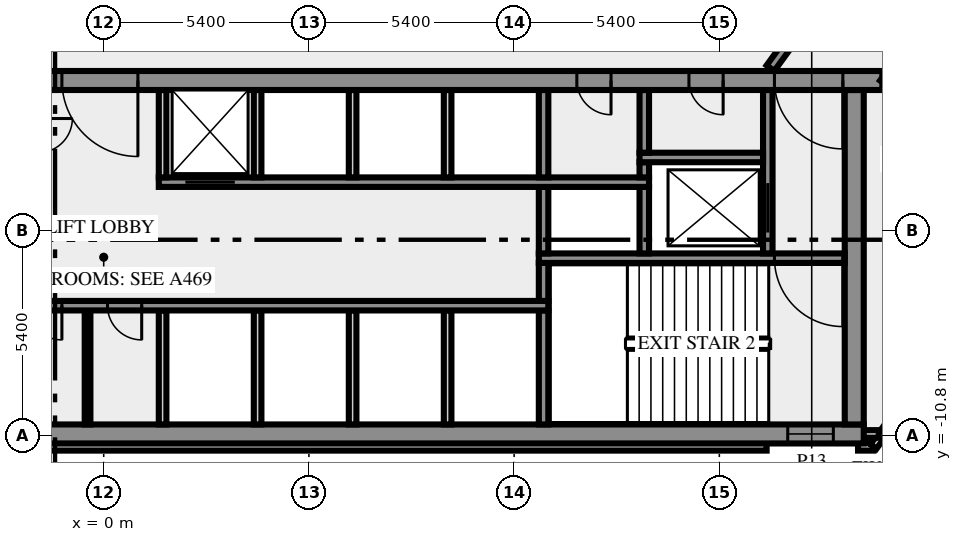
"""IFC4 building model, lengths in metres.
Left out: names, types, materials, properties, quantities, classifications, styles, units other than length and angle.
Written with IfcOpenShell. Run it as: python <this file> out.ifc"""

import sys

from ifc_helpers import new_model, si_unit, direction, frame, frame_2d, origin, place, context, subcontext, project, spatial, rectangle, extrude, element, fill, save


model = new_model("IFC4")
c1 = context("Model", 3, precision=1e-05, world=origin(), true_north=direction((0.0, 1.0)))
c2 = subcontext(c1, "Body", "Model", "MODEL_VIEW")
j1 = project(units=[si_unit("LENGTHUNIT", "METRE"), si_unit("PLANEANGLEUNIT", "RADIAN")], contexts=[c1])
p1 = place(None, origin())
s1 = spatial("IfcSite", under=j1, at=p1, CompositionType="ELEMENT")
p2 = place(p1, origin())
s2 = spatial("IfcBuilding", under=s1, at=p2, CompositionType="ELEMENT")
p3 = place(p2, frame((0.0, 0.0, 105.0)))
s3 = spatial("IfcBuildingStorey", under=s2, at=p3, CompositionType="ELEMENT", Elevation=105.0)
p4 = place(p3, frame((-17.444, -11.088, 0.0), z_axis=(0.0, 0.0, 1.0), x_axis=(1.0, 0.0, 0.0)))
e1 = element("IfcWall", 1, at=p4, inside=s3, PredefinedType="SOLIDWALL", context=c2, shape_type="SweptSolid", body=[
    extrude(rectangle(XDim=34.888, YDim=0.2, at=frame_2d((17.444, 0.0))), origin(), (0.0, 0.0, 1.0), 3.65),
])
p5 = place(p3, frame((19.85, -11.088, 0.0), z_axis=(0.0, 0.0, 1.0), x_axis=(1.0, 0.0, 0.0)))
e2 = element("IfcWall", 2, at=p5, inside=s3, PredefinedType="SOLIDWALL", context=c2, shape_type="SweptSolid", body=[
    extrude(rectangle(XDim=0.406, YDim=0.2, at=frame_2d((0.203, 0.0))), origin(), (0.0, 0.0, 1.0), 3.65),
])
p6 = place(p3, frame((20.253, -11.083, 0.0), z_axis=(0.0, 0.0, 1.0), x_axis=(0.587766567315, 0.809030569476, 0.0)))
e3 = element("IfcWall", 3, at=p6, inside=s3, PredefinedType="SOLIDWALL", context=c2, shape_type="SweptSolid", body=[
    extrude(rectangle(XDim=2.688, YDim=0.2, at=frame_2d((1.344, 0.0))), origin(), (0.0, 0.0, 1.0), 3.65),
])
p7 = place(p3, frame((19.98, -10.75, 0.0), z_axis=(0.0, 0.0, 1.0), x_axis=(1.0, 0.0, 0.0)))
e4 = element("IfcWall", 4, at=p7, inside=s3, PredefinedType="SOLIDWALL", context=c2, shape_type="SweptSolid", body=[
    extrude(rectangle(XDim=0.417, YDim=0.2, at=frame_2d((0.208, 0.0))), origin(), (0.0, 0.0, 1.0), 3.65),
])
p8 = place(p3, frame((-20.0, -10.75, 0.0), z_axis=(0.0, 0.0, 1.0), x_axis=(1.0, 0.0, 0.0)))
e5 = element("IfcWall", 5, at=p8, inside=s3, PredefinedType="SHEAR", context=c2, shape_type="SweptSolid", body=[
    extrude(rectangle(XDim=40.0, YDim=0.5, at=frame_2d((20.0, 0.0))), origin(), (0.0, 0.0, 1.0), 3.65),
])
p9 = place(p8, frame((0.8, 0.0, 1.0)))
e6 = element("IfcOpeningElement", 6, at=p9, cuts=e5, PredefinedType="OPENING", context=c2, shape_type="SweptSolid", body=[
    extrude(rectangle(XDim=1.2, YDim=1.2, at=frame_2d((0.6, 0.6))), frame((0.0, 0.26, 0.0), z_axis=(0.0, -1.0, 0.0), x_axis=(1.0, 0.0, 0.0)), (0.0, 0.0, 1.0), 0.52),
])
p10 = place(p8, frame((38.0, 0.0, 1.0)))
e7 = element("IfcOpeningElement", 7, at=p10, cuts=e5, PredefinedType="OPENING", context=c2, shape_type="SweptSolid", body=[
    extrude(rectangle(XDim=1.2, YDim=1.2, at=frame_2d((0.6, 0.6))), frame((0.0, 0.26, 0.0), z_axis=(0.0, -1.0, 0.0), x_axis=(1.0, 0.0, 0.0)), (0.0, 0.0, 1.0), 0.52),
])
p11 = place(p3, frame((-0.425, -10.5, 0.0), z_axis=(0.0, 0.0, 1.0), x_axis=(0.0, 1.0, 0.0)))
e8 = element("IfcWall", 8, at=p11, inside=s3, PredefinedType="PARTITIONING", context=c2, shape_type="SweptSolid", body=[
    extrude(rectangle(XDim=3.0, YDim=0.15, at=frame_2d((1.5, 0.0))), origin(), (0.0, 0.0, 1.0), 3.65),
])
for number, where, z_axis, x_axis in (
    (9, (1.55, -10.5, 0.0), (0.0, 0.0, 1.0), (0.0, 1.0, 0.0)),
    (10, (4.05, -10.5, 0.0), (0.0, 0.0, 1.0), (0.0, 1.0, 0.0)),
    (11, (6.55, -10.5, 0.0), (0.0, 0.0, 1.0), (0.0, 1.0, 0.0)),
    (12, (9.05, -10.5, 0.0), (0.0, 0.0, 1.0), (0.0, 1.0, 0.0)),
):
    element("IfcWall", number, at=place(p3, frame(where, z_axis=z_axis, x_axis=x_axis)), inside=s3, PredefinedType="SOLIDWALL", context=c2, shape_type="SweptSolid", body=[
        extrude(rectangle(XDim=3.0, YDim=0.2, at=frame_2d((1.5, 0.0))), origin(), (0.0, 0.0, 1.0), 3.65),
    ])
p12 = place(p3, frame((11.575, -10.5, 0.0), z_axis=(0.0, 0.0, 1.0), x_axis=(0.0, 1.0, 0.0)))
e13 = element("IfcWall", 13, at=p12, inside=s3, PredefinedType="SHEAR", context=c2, shape_type="SweptSolid", body=[
    extrude(rectangle(XDim=3.0, YDim=0.25, at=frame_2d((1.5, 0.0))), origin(), (0.0, 0.0, 1.0), 3.65),
])
p13 = place(p3, frame((19.75, -10.5, 0.0), z_axis=(0.0, 0.0, 1.0), x_axis=(0.0, 1.0, 0.0)))
e14 = element("IfcWall", 14, at=p13, inside=s3, PredefinedType="SHEAR", context=c2, shape_type="SweptSolid", body=[
    extrude(rectangle(XDim=8.8, YDim=0.5, at=frame_2d((4.4, 0.0))), origin(), (0.0, 0.0, 1.0), 3.65),
])
p14 = place(p3, frame((11.7, -7.375, 0.0), z_axis=(0.0, 0.0, 1.0), x_axis=(-1.0, 0.0, 0.0)))
e15 = element("IfcWall", 15, at=p14, inside=s3, PredefinedType="SHEAR", context=c2, shape_type="SweptSolid", body=[
    extrude(rectangle(XDim=23.4, YDim=0.25, at=frame_2d((11.7, 0.0))), origin(), (0.0, 0.0, 1.0), 3.65),
])
p15 = place(p14, frame((21.45, 0.0, 0.0)))
e16 = element("IfcOpeningElement", 16, at=p15, cuts=e15, PredefinedType="OPENING", context=c2, shape_type="SweptSolid", body=[
    extrude(rectangle(XDim=1.1, YDim=2.1, at=frame_2d((0.55, 1.05))), frame((0.0, 0.135, 0.0), z_axis=(0.0, -1.0, 0.0), x_axis=(1.0, 0.0, 0.0)), (0.0, 0.0, 1.0), 0.27),
])
p16 = place(p14, frame((18.95, 0.0, 0.0)))
e17 = element("IfcOpeningElement", 17, at=p16, cuts=e15, PredefinedType="OPENING", context=c2, shape_type="SweptSolid", body=[
    extrude(rectangle(XDim=1.1, YDim=2.1, at=frame_2d((0.55, 1.05))), frame((0.0, 0.135, 0.0), z_axis=(0.0, -1.0, 0.0), x_axis=(1.0, 0.0, 0.0)), (0.0, 0.0, 1.0), 0.27),
])
p17 = place(p14, frame((16.45, 0.0, 0.0)))
e18 = element("IfcOpeningElement", 18, at=p17, cuts=e15, PredefinedType="OPENING", context=c2, shape_type="SweptSolid", body=[
    extrude(rectangle(XDim=1.1, YDim=2.1, at=frame_2d((0.55, 1.05))), frame((0.0, 0.135, 0.0), z_axis=(0.0, -1.0, 0.0), x_axis=(1.0, 0.0, 0.0)), (0.0, 0.0, 1.0), 0.27),
])
p18 = place(p14, frame((14.65, 0.0, 0.0)))
e19 = element("IfcOpeningElement", 19, at=p18, cuts=e15, PredefinedType="OPENING", context=c2, shape_type="SweptSolid", body=[
    extrude(rectangle(XDim=0.8, YDim=2.1, at=frame_2d((0.4, 1.05))), frame((0.0, 0.135, 0.0), z_axis=(0.0, -1.0, 0.0), x_axis=(1.0, 0.0, 0.0)), (0.0, 0.0, 1.0), 0.27),
])
p19 = place(p14, frame((12.8, 0.0, 0.0)))
e20 = element("IfcOpeningElement", 20, at=p19, cuts=e15, PredefinedType="OPENING", context=c2, shape_type="SweptSolid", body=[
    extrude(rectangle(XDim=0.9, YDim=2.1, at=frame_2d((0.45, 1.05))), frame((0.0, 0.135, 0.0), z_axis=(0.0, -1.0, 0.0), x_axis=(1.0, 0.0, 0.0)), (0.0, 0.0, 1.0), 0.27),
])
p20 = place(p14, frame((10.7, 0.0, 0.0)))
e21 = element("IfcOpeningElement", 21, at=p20, cuts=e15, PredefinedType="OPENING", context=c2, shape_type="SweptSolid", body=[
    extrude(rectangle(XDim=0.9, YDim=2.1, at=frame_2d((0.45, 1.05))), frame((0.0, 0.135, 0.0), z_axis=(0.0, -1.0, 0.0), x_axis=(1.0, 0.0, 0.0)), (0.0, 0.0, 1.0), 0.27),
])
p21 = place(p3, frame((11.575, -7.25, 0.0), z_axis=(0.0, 0.0, 1.0), x_axis=(0.0, 1.0, 0.0)))
e22 = element("IfcWall", 22, at=p21, inside=s3, PredefinedType="SHEAR", context=c2, shape_type="SweptSolid", body=[
    extrude(rectangle(XDim=1.0, YDim=0.25, at=frame_2d((0.5, 0.0))), origin(), (0.0, 0.0, 1.0), 3.65),
])
p22 = place(p3, frame((19.5, -6.125, 0.0), z_axis=(0.0, 0.0, 1.0), x_axis=(-1.0, 0.0, 0.0)))
e23 = element("IfcWall", 23, at=p22, inside=s3, PredefinedType="SHEAR", context=c2, shape_type="SweptSolid", body=[
    extrude(rectangle(XDim=8.05, YDim=0.25, at=frame_2d((4.025, 0.0))), origin(), (0.0, 0.0, 1.0), 3.65),
])
p23 = place(p22, frame((0.05, 0.0, 0.0)))
e24 = element("IfcOpeningElement", 24, at=p23, cuts=e23, PredefinedType="OPENING", context=c2, shape_type="SweptSolid", body=[
    extrude(rectangle(XDim=1.8, YDim=2.1, at=frame_2d((0.9, 1.05))), frame((0.0, 0.135, 0.0), z_axis=(0.0, -1.0, 0.0), x_axis=(1.0, 0.0, 0.0)), (0.0, 0.0, 1.0), 0.27),
])
for number, where, z_axis, x_axis in (
    (25, (11.575, -6.0, 0.0), (0.0, 0.0, 1.0), (0.0, 1.0, 0.0)),
    (26, (14.225, -6.0, 0.0), (0.0, 0.0, 1.0), (0.0, 1.0, 0.0)),
):
    element("IfcWall", number, at=place(p3, frame(where, z_axis=z_axis, x_axis=x_axis)), inside=s3, PredefinedType="SHEAR", context=c2, shape_type="SweptSolid", body=[
        extrude(rectangle(XDim=1.75, YDim=0.25, at=frame_2d((0.875, 0.0))), origin(), (0.0, 0.0, 1.0), 3.65),
    ])
p24 = place(p3, frame((17.475, -6.0, 0.0), z_axis=(0.0, 0.0, 1.0), x_axis=(0.0, 1.0, 0.0)))
e27 = element("IfcWall", 27, at=p24, inside=s3, PredefinedType="SHEAR", context=c2, shape_type="SweptSolid", body=[
    extrude(rectangle(XDim=4.3, YDim=0.25, at=frame_2d((2.15, 0.0))), origin(), (0.0, 0.0, 1.0), 3.65),
])
p25 = place(p24, frame((0.55, 0.0, 0.0)))
e28 = element("IfcOpeningElement", 28, at=p25, cuts=e27, PredefinedType="OPENING", context=c2, shape_type="SweptSolid", body=[
    extrude(rectangle(XDim=1.3, YDim=2.1, at=frame_2d((0.65, 1.05))), frame((0.0, 0.135, 0.0), z_axis=(0.0, -1.0, 0.0), x_axis=(1.0, 0.0, 0.0)), (0.0, 0.0, 1.0), 0.27),
])
p26 = place(p3, frame((1.45, -4.125, 0.0), z_axis=(0.0, 0.0, 1.0), x_axis=(1.0, 0.0, 0.0)))
e29 = element("IfcWall", 29, at=p26, inside=s3, PredefinedType="SHEAR", context=c2, shape_type="SweptSolid", body=[
    extrude(rectangle(XDim=12.9, YDim=0.25, at=frame_2d((6.45, 0.0))), origin(), (0.0, 0.0, 1.0), 3.65),
])
p27 = place(p26, frame((0.7, 0.0, 0.0)))
e30 = element("IfcOpeningElement", 30, at=p27, cuts=e29, PredefinedType="OPENING", context=c2, shape_type="SweptSolid", body=[
    extrude(rectangle(XDim=1.3, YDim=2.1, at=frame_2d((0.65, 1.05))), frame((0.0, 0.135, 0.0), z_axis=(0.0, -1.0, 0.0), x_axis=(1.0, 0.0, 0.0)), (0.0, 0.0, 1.0), 0.27),
])
for number, where, z_axis, x_axis in (
    (31, (1.55, -4.0, 0.0), (0.0, 0.0, 1.0), (0.0, 1.0, 0.0)),
    (32, (4.05, -4.0, 0.0), (0.0, 0.0, 1.0), (0.0, 1.0, 0.0)),
    (33, (6.55, -4.0, 0.0), (0.0, 0.0, 1.0), (0.0, 1.0, 0.0)),
    (34, (9.05, -4.0, 0.0), (0.0, 0.0, 1.0), (0.0, 1.0, 0.0)),
):
    element("IfcWall", number, at=place(p3, frame(where, z_axis=z_axis, x_axis=x_axis)), inside=s3, PredefinedType="SOLIDWALL", context=c2, shape_type="SweptSolid", body=[
        extrude(rectangle(XDim=2.3, YDim=0.2, at=frame_2d((1.15, 0.0))), origin(), (0.0, 0.0, 1.0), 3.65),
    ])
p28 = place(p3, frame((11.575, -4.0, 0.0), z_axis=(0.0, 0.0, 1.0), x_axis=(0.0, 1.0, 0.0)))
e35 = element("IfcWall", 35, at=p28, inside=s3, PredefinedType="SHEAR", context=c2, shape_type="SweptSolid", body=[
    extrude(rectangle(XDim=2.3, YDim=0.25, at=frame_2d((1.15, 0.0))), origin(), (0.0, 0.0, 1.0), 3.65),
])
p29 = place(p3, frame((14.225, -4.0, 0.0), z_axis=(0.0, 0.0, 1.0), x_axis=(0.0, 1.0, 0.0)))
e36 = element("IfcWall", 36, at=p29, inside=s3, PredefinedType="SHEAR", context=c2, shape_type="SweptSolid", body=[
    extrude(rectangle(XDim=0.4, YDim=0.25, at=frame_2d((0.2, 0.0))), origin(), (0.0, 0.0, 1.0), 3.65),
])
p30 = place(p3, frame((14.1, -3.475, 0.0), z_axis=(0.0, 0.0, 1.0), x_axis=(1.0, 0.0, 0.0)))
e37 = element("IfcWall", 37, at=p30, inside=s3, PredefinedType="SHEAR", context=c2, shape_type="SweptSolid", body=[
    extrude(rectangle(XDim=3.25, YDim=0.25, at=frame_2d((1.625, 0.0))), origin(), (0.0, 0.0, 1.0), 3.65),
])
p31 = place(p3, frame((14.225, -3.35, 0.0), z_axis=(0.0, 0.0, 1.0), x_axis=(0.0, 1.0, 0.0)))
e38 = element("IfcWall", 38, at=p31, inside=s3, PredefinedType="SHEAR", context=c2, shape_type="SweptSolid", body=[
    extrude(rectangle(XDim=1.65, YDim=0.25, at=frame_2d((0.825, 0.0))), origin(), (0.0, 0.0, 1.0), 3.65),
])
p32 = place(p3, frame((20.49, -1.45, 0.0), z_axis=(0.0, 0.0, 1.0), x_axis=(-1.0, 0.0, 0.0)))
e39 = element("IfcWall", 39, at=p32, inside=s3, PredefinedType="SHEAR", context=c2, shape_type="SweptSolid", body=[
    extrude(rectangle(XDim=40.98, YDim=0.5, at=frame_2d((20.49, 0.0))), origin(), (0.0, 0.0, 1.0), 3.65),
])
p33 = place(p32, frame((38.14, 0.0, 0.0)))
e40 = element("IfcOpeningElement", 40, at=p33, cuts=e39, PredefinedType="OPENING", context=c2, shape_type="SweptSolid", body=[
    extrude(rectangle(XDim=1.8, YDim=2.1, at=frame_2d((0.9, 1.05))), frame((0.0, 0.26, 0.0), z_axis=(0.0, -1.0, 0.0), x_axis=(1.0, 0.0, 0.0)), (0.0, 0.0, 1.0), 0.52),
])
p34 = place(p32, frame((36.728, 0.0, 0.0)))
e41 = element("IfcOpeningElement", 41, at=p34, cuts=e39, PredefinedType="OPENING", context=c2, shape_type="SweptSolid", body=[
    extrude(rectangle(XDim=0.8, YDim=2.1, at=frame_2d((0.4, 1.05))), frame((0.0, 0.26, 0.0), z_axis=(0.0, -1.0, 0.0), x_axis=(1.0, 0.0, 0.0)), (0.0, 0.0, 1.0), 0.52),
])
p35 = place(p32, frame((35.153, 0.0, 0.0)))
e42 = element("IfcOpeningElement", 42, at=p35, cuts=e39, PredefinedType="OPENING", context=c2, shape_type="SweptSolid", body=[
    extrude(rectangle(XDim=0.8, YDim=2.1, at=frame_2d((0.4, 1.05))), frame((0.0, 0.26, 0.0), z_axis=(0.0, -1.0, 0.0), x_axis=(1.0, 0.0, 0.0)), (0.0, 0.0, 1.0), 0.52),
])
p36 = place(p32, frame((32.94, 0.0, 0.0)))
e43 = element("IfcOpeningElement", 43, at=p36, cuts=e39, PredefinedType="OPENING", context=c2, shape_type="SweptSolid", body=[
    extrude(rectangle(XDim=0.9, YDim=2.1, at=frame_2d((0.45, 1.05))), frame((0.0, 0.26, 0.0), z_axis=(0.0, -1.0, 0.0), x_axis=(1.0, 0.0, 0.0)), (0.0, 0.0, 1.0), 0.52),
])
p37 = place(p32, frame((19.59, 0.0, 0.0)))
e44 = element("IfcOpeningElement", 44, at=p37, cuts=e39, PredefinedType="OPENING", context=c2, shape_type="SweptSolid", body=[
    extrude(rectangle(XDim=2.0, YDim=2.1, at=frame_2d((1.0, 1.05))), frame((0.0, 0.26, 0.0), z_axis=(0.0, -1.0, 0.0), x_axis=(1.0, 0.0, 0.0)), (0.0, 0.0, 1.0), 0.52),
])
p38 = place(p32, frame((7.14, 0.0, 0.0)))
e45 = element("IfcOpeningElement", 45, at=p38, cuts=e39, PredefinedType="OPENING", context=c2, shape_type="SweptSolid", body=[
    extrude(rectangle(XDim=0.9, YDim=2.1, at=frame_2d((0.45, 1.05))), frame((0.0, 0.26, 0.0), z_axis=(0.0, -1.0, 0.0), x_axis=(1.0, 0.0, 0.0)), (0.0, 0.0, 1.0), 0.52),
])
p39 = place(p32, frame((4.19, 0.0, 0.0)))
e46 = element("IfcOpeningElement", 46, at=p39, cuts=e39, PredefinedType="OPENING", context=c2, shape_type="SweptSolid", body=[
    extrude(rectangle(XDim=0.9, YDim=2.1, at=frame_2d((0.45, 1.05))), frame((0.0, 0.26, 0.0), z_axis=(0.0, -1.0, 0.0), x_axis=(1.0, 0.0, 0.0)), (0.0, 0.0, 1.0), 0.52),
])
p40 = place(p32, frame((1.04, 0.0, 0.0)))
e47 = element("IfcOpeningElement", 47, at=p40, cuts=e39, PredefinedType="OPENING", context=c2, shape_type="SweptSolid", body=[
    extrude(rectangle(XDim=1.8, YDim=2.1, at=frame_2d((0.9, 1.05))), frame((0.0, 0.26, 0.0), z_axis=(0.0, -1.0, 0.0), x_axis=(1.0, 0.0, 0.0)), (0.0, 0.0, 1.0), 0.52),
])
p41 = place(p3, frame((17.545, -1.125, 0.0), z_axis=(0.0, 0.0, 1.0), x_axis=(0.587791430994, 0.80901250525, 0.0)))
e48 = element("IfcWall", 48, at=p41, inside=s3, PredefinedType="SOLIDWALL", context=c2, shape_type="SweptSolid", body=[
    extrude(rectangle(XDim=24.703, YDim=0.25, at=frame_2d((12.352, 0.0))), origin(), (0.0, 0.0, 1.0), 3.65),
])
p42 = place(p41, frame((3.442, 0.0, 0.0)))
e49 = element("IfcOpeningElement", 49, at=p42, cuts=e48, PredefinedType="OPENING", context=c2, shape_type="SweptSolid", body=[
    extrude(rectangle(XDim=1.2, YDim=2.1, at=frame_2d((0.6, 1.05))), frame((0.0, 0.135, 0.0), z_axis=(0.0, -1.0, 0.0), x_axis=(1.0, 0.0, 0.0)), (0.0, 0.0, 1.0), 0.27),
])
p43 = place(p41, frame((23.329, 0.0, 0.0)))
e50 = element("IfcOpeningElement", 50, at=p43, cuts=e48, PredefinedType="OPENING", context=c2, shape_type="SweptSolid", body=[
    extrude(rectangle(XDim=0.9, YDim=2.1, at=frame_2d((0.45, 1.05))), frame((0.0, 0.135, 0.0), z_axis=(0.0, -1.0, 0.0), x_axis=(1.0, 0.0, 0.0)), (0.0, 0.0, 1.0), 0.27),
])
p44 = place(p3, frame((34.062, 17.101, 0.0), z_axis=(0.0, 0.0, 1.0), x_axis=(-0.58778129431, -0.809019870003, 0.0)))
e51 = element("IfcWall", 51, at=p44, inside=s3, PredefinedType="SOLIDWALL", context=c2, shape_type="SweptSolid", body=[
    extrude(rectangle(XDim=23.021, YDim=0.25, at=frame_2d((11.51, 0.0))), origin(), (0.0, 0.0, 1.0), 3.65),
])
p45 = place(p44, frame((11.304, 0.0, 0.0)))
e52 = element("IfcOpeningElement", 52, at=p45, cuts=e51, PredefinedType="OPENING", context=c2, shape_type="SweptSolid", body=[
    extrude(rectangle(XDim=1.2, YDim=2.1, at=frame_2d((0.6, 1.05))), frame((0.0, 0.135, 0.0), z_axis=(0.0, -1.0, 0.0), x_axis=(1.0, 0.0, 0.0)), (0.0, 0.0, 1.0), 0.27),
])
p46 = place(p44, frame((13.205, 0.0, 0.0)))
e53 = element("IfcOpeningElement", 53, at=p46, cuts=e51, PredefinedType="OPENING", context=c2, shape_type="SweptSolid", body=[
    extrude(rectangle(XDim=0.9, YDim=2.1, at=frame_2d((0.45, 1.05))), frame((0.0, 0.135, 0.0), z_axis=(0.0, -1.0, 0.0), x_axis=(1.0, 0.0, 0.0)), (0.0, 0.0, 1.0), 0.27),
])
p47 = place(p10, origin())
e54 = element("IfcWindow", 54, at=p47, inside=s3, PartitioningType="SINGLE_PANEL", PredefinedType="WINDOW", context=c2, shape_type="SweptSolid", body=[
    extrude(rectangle(XDim=1.2, YDim=1.2, at=frame_2d((0.6, 0.6))), frame((0.0, 0.03, 0.0), z_axis=(0.0, -1.0, 0.0), x_axis=(1.0, 0.0, 0.0)), (0.0, 0.0, 1.0), 0.06),
])
fill(e7, e54)
p48 = place(p19, origin())
e55 = element("IfcDoor", 55, at=p48, inside=s3, OperationType="SINGLE_SWING_RIGHT", PredefinedType="DOOR", context=c2, shape_type="SweptSolid", body=[
    extrude(rectangle(XDim=0.9, YDim=2.1, at=frame_2d((0.45, 1.05))), frame((0.0, 0.025, 0.0), z_axis=(0.0, -1.0, 0.0), x_axis=(1.0, 0.0, 0.0)), (0.0, 0.0, 1.0), 0.05),
])
fill(e20, e55)
p49 = place(p20, origin())
e56 = element("IfcDoor", 56, at=p49, inside=s3, OperationType="SINGLE_SWING_LEFT", PredefinedType="DOOR", context=c2, shape_type="SweptSolid", body=[
    extrude(rectangle(XDim=0.9, YDim=2.1, at=frame_2d((0.45, 1.05))), frame((0.0, 0.025, 0.0), z_axis=(0.0, -1.0, 0.0), x_axis=(1.0, 0.0, 0.0)), (0.0, 0.0, 1.0), 0.05),
])
fill(e21, e56)
p50 = place(p23, origin())
e57 = element("IfcDoor", 57, at=p50, inside=s3, OperationType="DOUBLE_DOOR_SINGLE_SWING", PredefinedType="DOOR", context=c2, shape_type="SweptSolid", body=[
    extrude(rectangle(XDim=1.8, YDim=2.1, at=frame_2d((0.9, 1.05))), frame((0.0, 0.025, 0.0), z_axis=(0.0, -1.0, 0.0), x_axis=(1.0, 0.0, 0.0)), (0.0, 0.0, 1.0), 0.05),
])
fill(e24, e57)
p51 = place(p25, origin())
e58 = element("IfcDoor", 58, at=p51, inside=s3, OperationType="DOUBLE_DOOR_SLIDING", PredefinedType="DOOR", context=c2, shape_type="SweptSolid", body=[
    extrude(rectangle(XDim=1.3, YDim=2.1, at=frame_2d((0.65, 1.05))), frame((0.0, 0.025, 0.0), z_axis=(0.0, -1.0, 0.0), x_axis=(1.0, 0.0, 0.0)), (0.0, 0.0, 1.0), 0.05),
])
fill(e28, e58)
p52 = place(p27, origin())
e59 = element("IfcDoor", 59, at=p52, inside=s3, OperationType="DOUBLE_DOOR_SLIDING", PredefinedType="DOOR", context=c2, shape_type="SweptSolid", body=[
    extrude(rectangle(XDim=1.3, YDim=2.1, at=frame_2d((0.65, 1.05))), frame((0.0, 0.025, 0.0), z_axis=(0.0, -1.0, 0.0), x_axis=(1.0, 0.0, 0.0)), (0.0, 0.0, 1.0), 0.05),
])
fill(e30, e59)
p53 = place(p37, origin())
e60 = element("IfcDoor", 60, at=p53, inside=s3, OperationType="DOUBLE_DOOR_SINGLE_SWING", PredefinedType="DOOR", context=c2, shape_type="SweptSolid", body=[
    extrude(rectangle(XDim=2.0, YDim=2.1, at=frame_2d((1.0, 1.05))), frame((0.0, 0.025, 0.0), z_axis=(0.0, -1.0, 0.0), x_axis=(1.0, 0.0, 0.0)), (0.0, 0.0, 1.0), 0.05),
])
fill(e44, e60)
p54 = place(p38, origin())
e61 = element("IfcDoor", 61, at=p54, inside=s3, OperationType="SINGLE_SWING_LEFT", PredefinedType="DOOR", context=c2, shape_type="SweptSolid", body=[
    extrude(rectangle(XDim=0.9, YDim=2.1, at=frame_2d((0.45, 1.05))), frame((0.0, 0.025, 0.0), z_axis=(0.0, -1.0, 0.0), x_axis=(1.0, 0.0, 0.0)), (0.0, 0.0, 1.0), 0.05),
])
fill(e45, e61)
p55 = place(p39, origin())
e62 = element("IfcDoor", 62, at=p55, inside=s3, OperationType="SINGLE_SWING_LEFT", PredefinedType="DOOR", context=c2, shape_type="SweptSolid", body=[
    extrude(rectangle(XDim=0.9, YDim=2.1, at=frame_2d((0.45, 1.05))), frame((0.0, 0.025, 0.0), z_axis=(0.0, -1.0, 0.0), x_axis=(1.0, 0.0, 0.0)), (0.0, 0.0, 1.0), 0.05),
])
fill(e46, e62)
p56 = place(p40, origin())
e63 = element("IfcDoor", 63, at=p56, inside=s3, OperationType="DOUBLE_DOOR_SINGLE_SWING", PredefinedType="DOOR", context=c2, shape_type="SweptSolid", body=[
    extrude(rectangle(XDim=1.8, YDim=2.1, at=frame_2d((0.9, 1.05))), frame((0.0, 0.025, 0.0), z_axis=(0.0, -1.0, 0.0), x_axis=(1.0, 0.0, 0.0)), (0.0, 0.0, 1.0), 0.05),
])
fill(e47, e63)
save(model, sys.argv[1])
